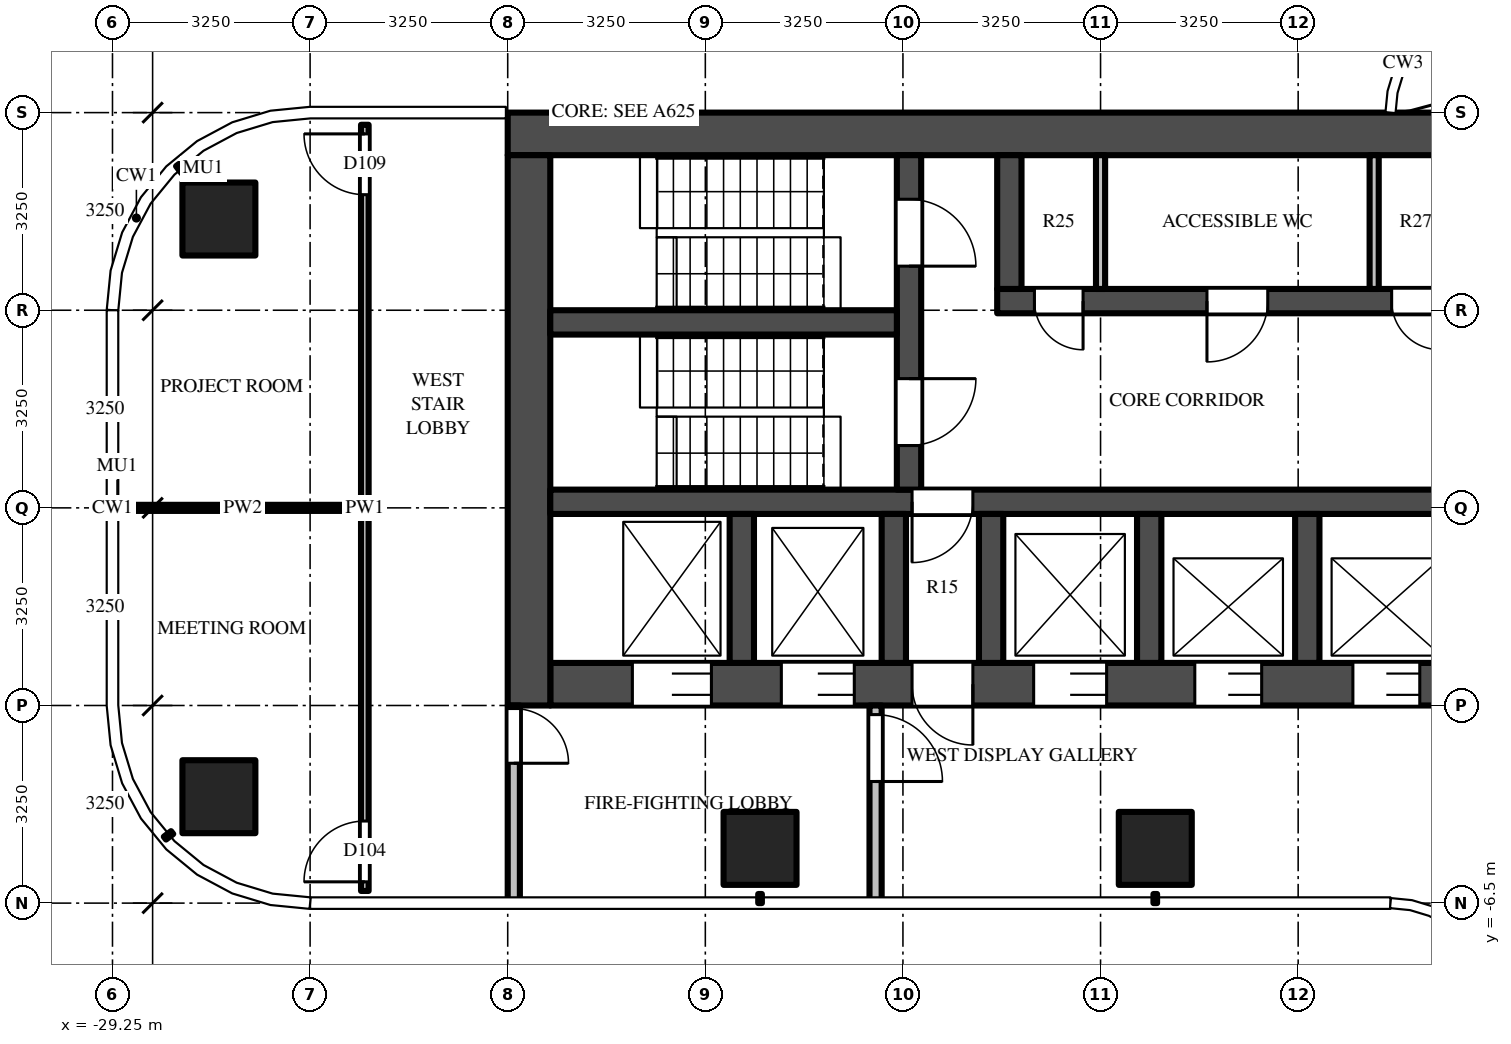
"""IFC4 building model, lengths in metres.
Left out: names, types, materials, properties, quantities, classifications, styles, units other than length and angle.
Written with IfcOpenShell. Run it as: python <this file> out.ifc"""

import sys

from ifc_helpers import new_model, si_unit, direction, frame, frame_2d, origin, origin_2d, place, context, subcontext, project, spatial, polyline, rectangle, outline, extrude, source, transform, mapped, element, fill, save


model = new_model("IFC4")
c1 = context("Model", 3, precision=1e-05, world=origin(), true_north=direction((0.0, 1.0)))
c2 = subcontext(c1, "Body", "Model", "MODEL_VIEW")
j1 = project(units=[si_unit("LENGTHUNIT", "METRE"), si_unit("PLANEANGLEUNIT", "RADIAN")], contexts=[c1])
p1 = place(None, origin())
s1 = spatial("IfcSite", under=j1, at=p1, CompositionType="ELEMENT")
p2 = place(p1, origin())
s2 = spatial("IfcBuilding", under=s1, at=p2, CompositionType="ELEMENT")
p3 = place(p2, frame((0.0, 0.0, 204.9)))
s3 = spatial("IfcBuildingStorey", under=s2, at=p3, CompositionType="ELEMENT", Elevation=204.9)
m1 = source(origin(), c2, "Body", "SweptSolid", [
    extrude(rectangle(XDim=1.2, YDim=1.2, at=origin_2d()), origin(), (0.0, 0.0, 1.0), 3.9),
])
for number, where, z_axis, x_axis in (
    (1, (-12.1, -5.6, 0.0), (0.0, 0.0, 1.0), (1.0, 0.0, 0.0)),
    (2, (-18.6, -5.6, 0.0), (0.0, 0.0, 1.0), (1.0, 0.0, 0.0)),
    (3, (-27.5, -4.75, 0.0), (0.0, 0.0, 1.0), (1.0, 0.0, 0.0)),
    (4, (-27.5, 4.75, 0.0), (0.0, 0.0, 1.0), (1.0, 0.0, 0.0)),
):
    element("IfcColumn", number, at=place(p3, frame(where, z_axis=z_axis, x_axis=x_axis)), inside=s3, PredefinedType="COLUMN", context=c2, shape_type="MappedRepresentation", body=[
        mapped(m1, transform((0.0, 0.0, 0.0))),
    ])
m2 = source(origin(), c2, "Body", "SweptSolid", [
    extrude(rectangle(XDim=16.55, YDim=0.7, at=frame_2d((8.275, 0.0))), origin(), (0.0, 0.0, 1.0), 3.7),
])
p4 = place(p3, frame((-6.2, 6.15, 0.0), z_axis=(0.0, 0.0, 1.0), x_axis=(-1.0, 0.0, 0.0)))
e5 = element("IfcWall", 5, at=p4, inside=s3, PredefinedType="SHEAR", context=c2, shape_type="MappedRepresentation", body=[
    mapped(m2, transform((0.0, 0.0, 0.0))),
])
m3 = source(origin(), c2, "Body", "SweptSolid", [
    extrude(rectangle(XDim=14.85, YDim=0.7, at=frame_2d((7.425, 0.0))), origin(), (0.0, 0.0, 1.0), 3.7),
])
p5 = place(p3, frame((-7.2, -2.9, 0.0), z_axis=(0.0, 0.0, 1.0), x_axis=(-1.0, 0.0, 0.0)))
e6 = element("IfcWall", 6, at=p5, inside=s3, PredefinedType="SHEAR", context=c2, shape_type="MappedRepresentation", body=[
    mapped(m3, transform((0.0, 0.0, 0.0))),
])
m4 = source(origin(), c2, "Body", "SweptSolid", [
    extrude(rectangle(XDim=1.1, YDim=2.1, at=frame_2d((0.55, 1.05))), frame((0.0, 0.36, 0.0), z_axis=(0.0, -1.0, 0.0), x_axis=(1.0, 0.0, 0.0)), (0.0, 0.0, 1.0), 0.72),
])
p6 = place(p5, frame((0.55, 0.0, 0.0)))
e7 = element("IfcOpeningElement", 7, at=p6, cuts=e6, PredefinedType="OPENING", context=c2, shape_type="MappedRepresentation", body=[
    mapped(m4, transform((0.0, 0.0, 0.0))),
])
p7 = place(p5, frame((3.15, 0.0, 0.0)))
e8 = element("IfcOpeningElement", 8, at=p7, cuts=e6, PredefinedType="OPENING", context=c2, shape_type="MappedRepresentation", body=[
    mapped(m4, transform((0.0, 0.0, 0.0))),
])
m5 = source(origin(), c2, "Body", "SweptSolid", [
    extrude(rectangle(XDim=1.2, YDim=2.1, at=frame_2d((0.6, 1.05))), frame((0.0, 0.36, 0.0), z_axis=(0.0, -1.0, 0.0), x_axis=(1.0, 0.0, 0.0)), (0.0, 0.0, 1.0), 0.72),
])
p8 = place(p5, frame((5.7, 0.0, 0.0)))
e9 = element("IfcOpeningElement", 9, at=p8, cuts=e6, PredefinedType="OPENING", context=c2, shape_type="MappedRepresentation", body=[
    mapped(m5, transform((0.0, 0.0, 0.0))),
])
m6 = source(origin(), c2, "Body", "SweptSolid", [
    extrude(rectangle(XDim=1.3, YDim=2.1, at=frame_2d((0.65, 1.05))), frame((0.0, 0.36, 0.0), z_axis=(0.0, -1.0, 0.0), x_axis=(1.0, 0.0, 0.0)), (0.0, 0.0, 1.0), 0.72),
])
p9 = place(p5, frame((12.2, 0.0, 0.0)))
e10 = element("IfcOpeningElement", 10, at=p9, cuts=e6, PredefinedType="OPENING", context=c2, shape_type="MappedRepresentation", body=[
    mapped(m6, transform((0.0, 0.0, 0.0))),
])
p10 = place(p5, frame((9.85, 0.0, 0.0)))
e11 = element("IfcOpeningElement", 11, at=p10, cuts=e6, PredefinedType="OPENING", context=c2, shape_type="MappedRepresentation", body=[
    mapped(m5, transform((0.0, 0.0, 0.0))),
])
m7 = source(origin(), c2, "Body", "SweptSolid", [
    extrude(rectangle(XDim=1.0, YDim=2.1, at=frame_2d((0.5, 1.05))), frame((0.0, 0.36, 0.0), z_axis=(0.0, -1.0, 0.0), x_axis=(1.0, 0.0, 0.0)), (0.0, 0.0, 1.0), 0.72),
])
p11 = place(p5, frame((7.9, 0.0, 0.0)))
e12 = element("IfcOpeningElement", 12, at=p11, cuts=e6, PredefinedType="OPENING", context=c2, shape_type="MappedRepresentation", body=[
    mapped(m7, transform((0.0, 0.0, 0.0))),
])
m8 = source(origin(), c2, "Body", "SweptSolid", [
    extrude(rectangle(XDim=9.05, YDim=0.7, at=frame_2d((4.525, 0.0))), origin(), (0.0, 0.0, 1.0), 3.7),
])
p12 = place(p3, frame((-22.4, 5.8, 0.0), z_axis=(0.0, 0.0, 1.0), x_axis=(0.0, -1.0, 0.0)))
e13 = element("IfcWall", 13, at=p12, inside=s3, PredefinedType="SHEAR", context=c2, shape_type="MappedRepresentation", body=[
    mapped(m8, transform((0.0, 0.0, 0.0))),
])
m9 = source(origin(), c2, "Body", "SweptSolid", [
    extrude(rectangle(XDim=7.5, YDim=0.4, at=frame_2d((3.75, 0.0))), origin(), (0.0, 0.0, 1.0), 3.7),
])
p13 = place(p3, frame((-7.2, 3.4, 0.0), z_axis=(0.0, 0.0, 1.0), x_axis=(-1.0, 0.0, 0.0)))
e14 = element("IfcWall", 14, at=p13, inside=s3, PredefinedType="SHEAR", context=c2, shape_type="MappedRepresentation", body=[
    mapped(m9, transform((0.0, 0.0, 0.0))),
])
m10 = source(origin(), c2, "Body", "SweptSolid", [
    extrude(rectangle(XDim=0.8, YDim=2.1, at=frame_2d((0.4, 1.05))), frame((0.0, 0.21, 0.0), z_axis=(0.0, -1.0, 0.0), x_axis=(1.0, 0.0, 0.0)), (0.0, 0.0, 1.0), 0.42),
])
p14 = place(p13, frame((0.212, 0.0, 0.0)))
e15 = element("IfcOpeningElement", 15, at=p14, cuts=e14, PredefinedType="OPENING", context=c2, shape_type="MappedRepresentation", body=[
    mapped(m10, transform((0.0, 0.0, 0.0))),
])
m11 = source(origin(), c2, "Body", "SweptSolid", [
    extrude(rectangle(XDim=1.0, YDim=2.1, at=frame_2d((0.5, 1.05))), frame((0.0, 0.21, 0.0), z_axis=(0.0, -1.0, 0.0), x_axis=(1.0, 0.0, 0.0)), (0.0, 0.0, 1.0), 0.42),
])
p15 = place(p13, frame((3.05, 0.0, 0.0)))
e16 = element("IfcOpeningElement", 16, at=p15, cuts=e14, PredefinedType="OPENING", context=c2, shape_type="MappedRepresentation", body=[
    mapped(m11, transform((0.0, 0.0, 0.0))),
])
p16 = place(p13, frame((6.087, 0.0, 0.0)))
e17 = element("IfcOpeningElement", 17, at=p16, cuts=e14, PredefinedType="OPENING", context=c2, shape_type="MappedRepresentation", body=[
    mapped(m10, transform((0.0, 0.0, 0.0))),
])
m12 = source(origin(), c2, "Body", "SweptSolid", [
    extrude(rectangle(XDim=14.85, YDim=0.4, at=frame_2d((7.425, 0.0))), origin(), (0.0, 0.0, 1.0), 3.7),
])
p17 = place(p3, frame((-7.2, 0.1, 0.0), z_axis=(0.0, 0.0, 1.0), x_axis=(-1.0, 0.0, 0.0)))
e18 = element("IfcWall", 18, at=p17, inside=s3, PredefinedType="SHEAR", context=c2, shape_type="MappedRepresentation", body=[
    mapped(m12, transform((0.0, 0.0, 0.0))),
])
p18 = place(p17, frame((7.9, 0.0, 0.0)))
e19 = element("IfcOpeningElement", 19, at=p18, cuts=e18, PredefinedType="OPENING", context=c2, shape_type="MappedRepresentation", body=[
    mapped(m11, transform((0.0, 0.0, 0.0))),
])
m13 = source(origin(), c2, "Body", "SweptSolid", [
    extrude(rectangle(XDim=5.5, YDim=0.4, at=frame_2d((2.75, 0.0))), origin(), (0.0, 0.0, 1.0), 3.7),
])
p19 = place(p3, frame((-16.15, 5.8, 0.0), z_axis=(0.0, 0.0, 1.0), x_axis=(0.0, -1.0, 0.0)))
e20 = element("IfcWall", 20, at=p19, inside=s3, PredefinedType="SHEAR", context=c2, shape_type="MappedRepresentation", body=[
    mapped(m13, transform((0.0, 0.0, 0.0))),
])
m14 = source(origin(), c2, "Body", "SweptSolid", [
    extrude(rectangle(XDim=1.1, YDim=2.1, at=frame_2d((0.55, 1.05))), frame((0.0, 0.21, 0.0), z_axis=(0.0, -1.0, 0.0), x_axis=(1.0, 0.0, 0.0)), (0.0, 0.0, 1.0), 0.42),
])
p20 = place(p19, frame((0.725, 0.0, 0.0)))
e21 = element("IfcOpeningElement", 21, at=p20, cuts=e20, PredefinedType="OPENING", context=c2, shape_type="MappedRepresentation", body=[
    mapped(m14, transform((0.0, 0.0, 0.0))),
])
p21 = place(p19, frame((3.675, 0.0, 0.0)))
e22 = element("IfcOpeningElement", 22, at=p21, cuts=e20, PredefinedType="OPENING", context=c2, shape_type="MappedRepresentation", body=[
    mapped(m14, transform((0.0, 0.0, 0.0))),
])
m15 = source(origin(), c2, "Body", "SweptSolid", [
    extrude(rectangle(XDim=5.7, YDim=0.4, at=frame_2d((2.85, 0.0))), origin(), (0.0, 0.0, 1.0), 3.7),
])
p22 = place(p3, frame((-16.35, 3.05, 0.0), z_axis=(0.0, 0.0, 1.0), x_axis=(-1.0, 0.0, 0.0)))
e23 = element("IfcWall", 23, at=p22, inside=s3, PredefinedType="SHEAR", context=c2, shape_type="MappedRepresentation", body=[
    mapped(m15, transform((0.0, 0.0, 0.0))),
])
m16 = source(origin(), c2, "Body", "SweptSolid", [
    extrude(rectangle(XDim=2.2, YDim=0.4, at=frame_2d((1.1, 0.0))), origin(), (0.0, 0.0, 1.0), 3.7),
])
p23 = place(p3, frame((-14.5, 5.8, 0.0), z_axis=(0.0, 0.0, 1.0), x_axis=(0.0, -1.0, 0.0)))
e24 = element("IfcWall", 24, at=p23, inside=s3, PredefinedType="SHEAR", context=c2, shape_type="MappedRepresentation", body=[
    mapped(m16, transform((0.0, 0.0, 0.0))),
])
m17 = source(origin(), c2, "Body", "SweptSolid", [
    extrude(rectangle(XDim=2.45, YDim=0.4, at=frame_2d((1.225, 0.0))), origin(), (0.0, 0.0, 1.0), 3.7),
])
for number, where, z_axis, x_axis in (
    (25, (-9.6, -0.1, 0.0), (0.0, 0.0, 1.0), (0.0, -1.0, 0.0)),
    (26, (-12.2, -0.1, 0.0), (0.0, 0.0, 1.0), (0.0, -1.0, 0.0)),
    (27, (-14.8, -0.1, 0.0), (0.0, 0.0, 1.0), (0.0, -1.0, 0.0)),
    (28, (-16.4, -0.1, 0.0), (0.0, 0.0, 1.0), (0.0, -1.0, 0.0)),
    (29, (-18.9, -0.1, 0.0), (0.0, 0.0, 1.0), (0.0, -1.0, 0.0)),
):
    element("IfcWall", number, at=place(p3, frame(where, z_axis=z_axis, x_axis=x_axis)), inside=s3, PredefinedType="SHEAR", context=c2, shape_type="MappedRepresentation", body=[
        mapped(m17, transform((0.0, 0.0, 0.0))),
    ])
m18 = source(origin(), c2, "Body", "SweptSolid", [
    extrude(rectangle(XDim=3.25, YDim=0.2, at=frame_2d((1.625, 0.0))), origin(), (0.0, 0.0, 1.0), 3.7),
])
p24 = place(p3, frame((-16.7, -3.25, 0.0), z_axis=(0.0, 0.0, 1.0), x_axis=(0.0, -1.0, 0.0)))
e30 = element("IfcWall", 30, at=p24, inside=s3, PredefinedType="PARTITIONING", context=c2, shape_type="MappedRepresentation", body=[
    mapped(m18, transform((0.0, 0.0, 0.0))),
])
m19 = source(origin(), c2, "Body", "SweptSolid", [
    extrude(rectangle(XDim=1.1, YDim=2.1, at=frame_2d((0.55, 1.05))), frame((0.0, 0.11, 0.0), z_axis=(0.0, -1.0, 0.0), x_axis=(1.0, 0.0, 0.0)), (0.0, 0.0, 1.0), 0.22),
])
p25 = place(p24, frame((0.15, 0.0, 0.0)))
e31 = element("IfcOpeningElement", 31, at=p25, cuts=e30, PredefinedType="OPENING", context=c2, shape_type="MappedRepresentation", body=[
    mapped(m19, transform((0.0, 0.0, 0.0))),
])
p26 = place(p3, frame((-22.65, -3.25, 0.0), z_axis=(0.0, 0.0, 1.0), x_axis=(0.0, -1.0, 0.0)))
e32 = element("IfcWall", 32, at=p26, inside=s3, PredefinedType="PARTITIONING", context=c2, shape_type="MappedRepresentation", body=[
    mapped(m18, transform((0.0, 0.0, 0.0))),
])
m20 = source(origin(), c2, "Body", "SweptSolid", [
    extrude(rectangle(XDim=0.9, YDim=2.1, at=frame_2d((0.45, 1.05))), frame((0.0, 0.11, 0.0), z_axis=(0.0, -1.0, 0.0), x_axis=(1.0, 0.0, 0.0)), (0.0, 0.0, 1.0), 0.22),
])
p27 = place(p26, frame((0.05, 0.0, 0.0)))
e33 = element("IfcOpeningElement", 33, at=p27, cuts=e32, PredefinedType="OPENING", context=c2, shape_type="MappedRepresentation", body=[
    mapped(m20, transform((0.0, 0.0, 0.0))),
])
m21 = source(origin(), c2, "Body", "SweptSolid", [
    extrude(rectangle(XDim=2.2, YDim=0.15, at=frame_2d((1.1, 0.0))), origin(), (0.0, 0.0, 1.0), 3.7),
])
for number, where, z_axis, x_axis in (
    (34, (-8.5, 5.8, 0.0), (0.0, 0.0, 1.0), (0.0, -1.0, 0.0)),
    (35, (-13.0, 5.8, 0.0), (0.0, 0.0, 1.0), (0.0, -1.0, 0.0)),
):
    element("IfcWall", number, at=place(p3, frame(where, z_axis=z_axis, x_axis=x_axis)), inside=s3, PredefinedType="PARTITIONING", context=c2, shape_type="MappedRepresentation", body=[
        mapped(m21, transform((0.0, 0.0, 0.0))),
    ])
p28 = place(p3, origin())
e36 = element("IfcWall", 36, at=p28, inside=s3, PredefinedType="USERDEFINED", context=c2, shape_type="SweptSolid", body=[
    extrude(outline(polyline([(-28.0, 8.496), (-26.425, 8.765), (-26.021, 8.696), (-26.122, 8.104), (-26.425, 8.156), (-27.783, 7.924), (-28.913, 7.222), (-29.104, 6.961), (-29.588, 7.316), (-29.328, 7.67), (-28.0, 8.496)])), origin(), (0.0, 0.0, 1.0), 0.5),
])
m22 = source(origin(), c2, "Body", "SweptSolid", [
    extrude(rectangle(XDim=12.6, YDim=0.125, at=frame_2d((6.3, 0.0))), origin(), (0.0, 0.0, 1.0), 2.78),
])
p29 = place(p3, frame((-25.1, -6.3, 0.0), z_axis=(0.0, 0.0, 1.0), x_axis=(0.0, 1.0, 0.0)))
e37 = element("IfcWall", 37, at=p29, inside=s3, PredefinedType="PARTITIONING", context=c2, shape_type="MappedRepresentation", body=[
    mapped(m22, transform((0.0, 0.0, 0.0))),
])
m23 = source(origin(), c2, "Body", "SweptSolid", [
    extrude(rectangle(XDim=1.0, YDim=2.1, at=frame_2d((0.5, 1.05))), frame((0.0, 0.073, 0.0), z_axis=(0.0, -1.0, 0.0), x_axis=(1.0, 0.0, 0.0)), (0.0, 0.0, 1.0), 0.145),
])
p30 = place(p29, frame((0.15, 0.0, 0.0)))
e38 = element("IfcOpeningElement", 38, at=p30, cuts=e37, PredefinedType="OPENING", context=c2, shape_type="MappedRepresentation", body=[
    mapped(m23, transform((0.0, 0.0, 0.0))),
])
p31 = place(p29, frame((11.45, 0.0, 0.0)))
e39 = element("IfcOpeningElement", 39, at=p31, cuts=e37, PredefinedType="OPENING", context=c2, shape_type="MappedRepresentation", body=[
    mapped(m23, transform((0.0, 0.0, 0.0))),
])
m24 = source(origin(), c2, "Body", "SweptSolid", [
    extrude(rectangle(XDim=3.887, YDim=0.1, at=frame_2d((1.944, 0.0))), origin(), (0.0, 0.0, 1.0), 2.78),
])
p32 = place(p3, frame((-29.05, 0.0, 0.0), z_axis=(0.0, 0.0, 1.0), x_axis=(1.0, 0.0, 0.0)))
e40 = element("IfcWall", 40, at=p32, inside=s3, PredefinedType="PARTITIONING", context=c2, shape_type="MappedRepresentation", body=[
    mapped(m24, transform((0.0, 0.0, 0.0))),
])
m25 = source(origin(), c2, "Body", "SweptSolid", [
    extrude(rectangle(XDim=1.1, YDim=2.1, at=frame_2d((0.55, 1.05))), frame((0.0, -0.275, 0.0), z_axis=(0.0, -1.0, 0.0), x_axis=(1.0, 0.0, 0.0)), (0.0, 0.0, 1.0), 0.05),
])
p33 = place(p6, origin())
e41 = element("IfcDoor", 41, at=p33, inside=s3, OperationType="DOUBLE_DOOR_SLIDING", PredefinedType="DOOR", context=c2, shape_type="MappedRepresentation", body=[
    mapped(m25, transform((0.0, 0.0, 0.0))),
])
fill(e7, e41)
p34 = place(p7, origin())
e42 = element("IfcDoor", 42, at=p34, inside=s3, OperationType="DOUBLE_DOOR_SLIDING", PredefinedType="DOOR", context=c2, shape_type="MappedRepresentation", body=[
    mapped(m25, transform((0.0, 0.0, 0.0))),
])
fill(e8, e42)
m26 = source(origin(), c2, "Body", "SweptSolid", [
    extrude(rectangle(XDim=1.2, YDim=2.1, at=frame_2d((0.6, 1.05))), frame((0.0, -0.275, 0.0), z_axis=(0.0, -1.0, 0.0), x_axis=(1.0, 0.0, 0.0)), (0.0, 0.0, 1.0), 0.05),
])
p35 = place(p8, origin())
e43 = element("IfcDoor", 43, at=p35, inside=s3, OperationType="DOUBLE_DOOR_SLIDING", PredefinedType="DOOR", context=c2, shape_type="MappedRepresentation", body=[
    mapped(m26, transform((0.0, 0.0, 0.0))),
])
fill(e9, e43)
m27 = source(origin(), c2, "Body", "SweptSolid", [
    extrude(rectangle(XDim=1.3, YDim=2.1, at=frame_2d((0.65, 1.05))), frame((0.0, -0.275, 0.0), z_axis=(0.0, -1.0, 0.0), x_axis=(1.0, 0.0, 0.0)), (0.0, 0.0, 1.0), 0.05),
])
p36 = place(p9, origin())
e44 = element("IfcDoor", 44, at=p36, inside=s3, OperationType="DOUBLE_DOOR_SLIDING", PredefinedType="DOOR", context=c2, shape_type="MappedRepresentation", body=[
    mapped(m27, transform((0.0, 0.0, 0.0))),
])
fill(e10, e44)
p37 = place(p10, origin())
e45 = element("IfcDoor", 45, at=p37, inside=s3, OperationType="DOUBLE_DOOR_SLIDING", PredefinedType="DOOR", context=c2, shape_type="MappedRepresentation", body=[
    mapped(m26, transform((0.0, 0.0, 0.0))),
])
fill(e11, e45)
m28 = source(origin(), c2, "Body", "SweptSolid", [
    extrude(rectangle(XDim=1.1, YDim=2.1, at=frame_2d((0.55, 1.05))), frame((0.0, 0.025, 0.0), z_axis=(0.0, -1.0, 0.0), x_axis=(1.0, 0.0, 0.0)), (0.0, 0.0, 1.0), 0.05),
])
p38 = place(p20, origin())
e46 = element("IfcDoor", 46, at=p38, inside=s3, OperationType="SINGLE_SWING_RIGHT", PredefinedType="DOOR", context=c2, shape_type="MappedRepresentation", body=[
    mapped(m28, transform((0.0, 0.0, 0.0))),
])
fill(e21, e46)
p39 = place(p21, origin())
e47 = element("IfcDoor", 47, at=p39, inside=s3, OperationType="SINGLE_SWING_LEFT", PredefinedType="DOOR", context=c2, shape_type="MappedRepresentation", body=[
    mapped(m28, transform((0.0, 0.0, 0.0))),
])
fill(e22, e47)
m29 = source(origin(), c2, "Body", "SweptSolid", [
    extrude(rectangle(XDim=1.0, YDim=2.1, at=frame_2d((0.5, 1.05))), frame((0.0, 0.025, 0.0), z_axis=(0.0, -1.0, 0.0), x_axis=(1.0, 0.0, 0.0)), (0.0, 0.0, 1.0), 0.05),
])
p40 = place(p18, origin())
e48 = element("IfcDoor", 48, at=p40, inside=s3, OperationType="SINGLE_SWING_RIGHT", PredefinedType="DOOR", context=c2, shape_type="MappedRepresentation", body=[
    mapped(m29, transform((0.0, 0.0, 0.0))),
])
fill(e19, e48)
m30 = source(origin(), c2, "Body", "SweptSolid", [
    extrude(rectangle(XDim=1.0, YDim=2.1, at=frame_2d((0.5, 1.05))), frame((0.0, -0.275, 0.0), z_axis=(0.0, -1.0, 0.0), x_axis=(1.0, 0.0, 0.0)), (0.0, 0.0, 1.0), 0.05),
])
p41 = place(p11, origin())
e49 = element("IfcDoor", 49, at=p41, inside=s3, OperationType="SINGLE_SWING_LEFT", PredefinedType="DOOR", context=c2, shape_type="MappedRepresentation", body=[
    mapped(m30, transform((0.0, 0.0, 0.0))),
])
fill(e12, e49)
p42 = place(p25, origin())
e50 = element("IfcDoor", 50, at=p42, inside=s3, OperationType="SINGLE_SWING_RIGHT", PredefinedType="DOOR", context=c2, shape_type="MappedRepresentation", body=[
    mapped(m28, transform((0.0, 0.0, 0.0))),
])
fill(e31, e50)
m31 = source(origin(), c2, "Body", "SweptSolid", [
    extrude(rectangle(XDim=0.9, YDim=2.1, at=frame_2d((0.45, 1.05))), frame((0.0, 0.025, 0.0), z_axis=(0.0, -1.0, 0.0), x_axis=(1.0, 0.0, 0.0)), (0.0, 0.0, 1.0), 0.05),
])
p43 = place(p27, origin())
e51 = element("IfcDoor", 51, at=p43, inside=s3, OperationType="SINGLE_SWING_RIGHT", PredefinedType="DOOR", context=c2, shape_type="MappedRepresentation", body=[
    mapped(m31, transform((0.0, 0.0, 0.0))),
])
fill(e33, e51)
m32 = source(origin(), c2, "Body", "SweptSolid", [
    extrude(rectangle(XDim=0.8, YDim=2.1, at=frame_2d((0.4, 1.05))), frame((0.0, 0.025, 0.0), z_axis=(0.0, -1.0, 0.0), x_axis=(1.0, 0.0, 0.0)), (0.0, 0.0, 1.0), 0.05),
])
p44 = place(p14, origin())
e52 = element("IfcDoor", 52, at=p44, inside=s3, OperationType="SINGLE_SWING_LEFT", PredefinedType="DOOR", context=c2, shape_type="MappedRepresentation", body=[
    mapped(m32, transform((0.0, 0.0, 0.0))),
])
fill(e15, e52)
p45 = place(p15, origin())
e53 = element("IfcDoor", 53, at=p45, inside=s3, OperationType="SINGLE_SWING_RIGHT", PredefinedType="DOOR", context=c2, shape_type="MappedRepresentation", body=[
    mapped(m29, transform((0.0, 0.0, 0.0))),
])
fill(e16, e53)
p46 = place(p16, origin())
e54 = element("IfcDoor", 54, at=p46, inside=s3, OperationType="SINGLE_SWING_LEFT", PredefinedType="DOOR", context=c2, shape_type="MappedRepresentation", body=[
    mapped(m32, transform((0.0, 0.0, 0.0))),
])
fill(e17, e54)
p47 = place(p30, origin())
e55 = element("IfcDoor", 55, at=p47, inside=s3, OperationType="SINGLE_SWING_LEFT", PredefinedType="DOOR", context=c2, shape_type="MappedRepresentation", body=[
    mapped(m29, transform((0.0, 0.0, 0.0))),
])
fill(e38, e55)
p48 = place(p31, origin())
e56 = element("IfcDoor", 56, at=p48, inside=s3, OperationType="SINGLE_SWING_RIGHT", PredefinedType="DOOR", context=c2, shape_type="MappedRepresentation", body=[
    mapped(m29, transform((0.0, 0.0, 0.0))),
])
fill(e39, e56)
save(model, sys.argv[1])
